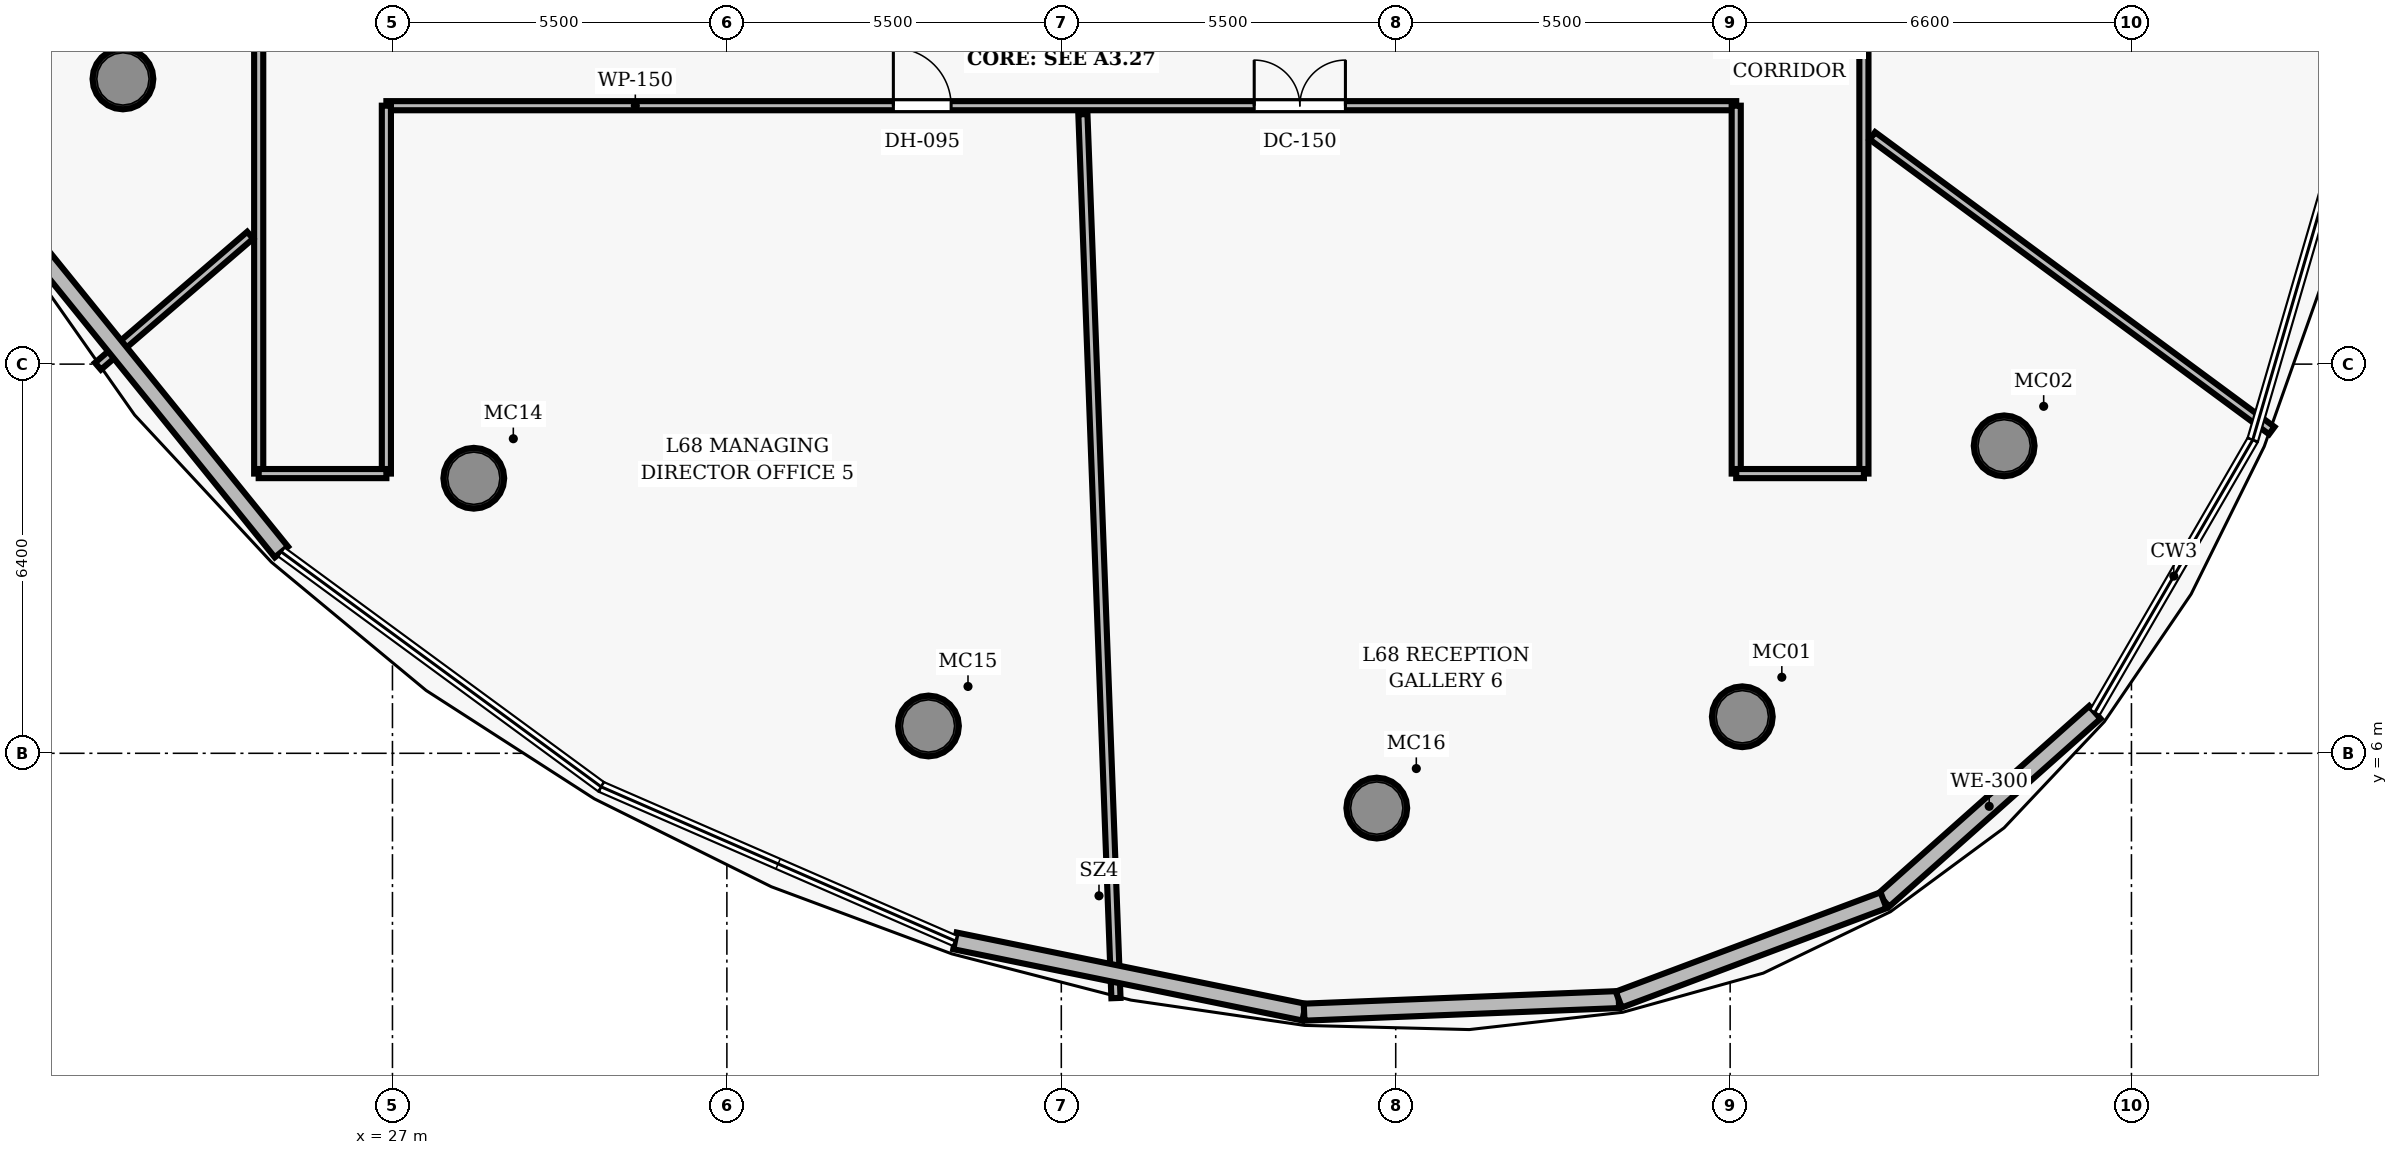
"""IFC4 building model, lengths in metres.
Left out: names, types, materials, properties, quantities, classifications, styles, units other than length and angle.
Written with IfcOpenShell. Run it as: python <this file> out.ifc"""

import sys

from ifc_helpers import new_model, si_unit, direction, frame, frame_2d, origin, origin_2d, place, context, subcontext, project, spatial, rectangle, hollow_circle, extrude, element, fill, save


model = new_model("IFC4")
c1 = context("Model", 3, precision=1e-05, world=origin(), true_north=direction((0.0, 1.0)))
c2 = subcontext(c1, "Body", "Model", "MODEL_VIEW")
j1 = project(units=[si_unit("LENGTHUNIT", "METRE"), si_unit("PLANEANGLEUNIT", "RADIAN")], contexts=[c1])
p1 = place(None, origin())
s1 = spatial("IfcSite", under=j1, at=p1, CompositionType="ELEMENT")
p2 = place(p1, origin())
s2 = spatial("IfcBuilding", under=s1, at=p2, CompositionType="ELEMENT")
p3 = place(p2, frame((0.0, 0.0, 269.0)))
s3 = spatial("IfcBuildingStorey", under=s2, at=p3, CompositionType="ELEMENT", Elevation=269.0)
for number, where, z_axis, x_axis in (
    (1, (49.2, 6.601, 0.0), (0.0, 0.0, 1.0), (1.0, 0.0, 0.0)),
    (2, (53.506, 11.056, 0.0), (0.0, 0.0, 1.0), (1.0, 0.0, 0.0)),
    (3, (22.567, 17.09, 0.0), (0.0, 0.0, 1.0), (1.0, 0.0, 0.0)),
    (4, (28.338, 10.523, 0.0), (0.0, 0.0, 1.0), (1.0, 0.0, 0.0)),
    (5, (35.815, 6.449, 0.0), (0.0, 0.0, 1.0), (1.0, 0.0, 0.0)),
    (6, (43.188, 5.099, 0.0), (0.0, 0.0, 1.0), (1.0, 0.0, 0.0)),
):
    element("IfcColumn", number, at=place(p3, frame(where, z_axis=z_axis, x_axis=x_axis)), inside=s3, PredefinedType="COLUMN", context=c2, shape_type="SweptSolid", body=[
        extrude(hollow_circle(Radius=0.5, WallThickness=0.045, at=origin_2d()), origin(), (0.0, 0.0, 1.0), 3.85),
    ])
p4 = place(p3, frame((26.9, 16.65, 0.0), z_axis=(0.0, 0.0, 1.0), x_axis=(1.0, 0.0, 0.0)))
e7 = element("IfcWall", 7, at=p4, inside=s3, PredefinedType="PARTITIONING", context=c2, shape_type="SweptSolid", body=[
    extrude(rectangle(XDim=22.2, YDim=0.15, at=frame_2d((11.1, 0.0))), origin(), (0.0, 0.0, 1.0), 3.04),
])
p5 = place(p4, frame((8.338, 0.0, 0.0)))
e8 = element("IfcOpeningElement", 8, at=p5, cuts=e7, PredefinedType="OPENING", context=c2, shape_type="SweptSolid", body=[
    extrude(rectangle(XDim=0.95, YDim=2.15, at=frame_2d((0.475, 1.075))), frame((0.0, 0.085, 0.0), z_axis=(0.0, -1.0, 0.0), x_axis=(1.0, 0.0, 0.0)), (0.0, 0.0, 1.0), 0.17),
])
p6 = place(p4, frame((14.273, 0.0, 0.0)))
e9 = element("IfcOpeningElement", 9, at=p6, cuts=e7, PredefinedType="OPENING", context=c2, shape_type="SweptSolid", body=[
    extrude(rectangle(XDim=1.5, YDim=2.2, at=frame_2d((0.75, 1.1))), frame((0.0, 0.085, 0.0), z_axis=(0.0, -1.0, 0.0), x_axis=(1.0, 0.0, 0.0)), (0.0, 0.0, 1.0), 0.17),
])
p7 = place(p3, frame((24.8, 10.6, 0.0), z_axis=(0.0, 0.0, 1.0), x_axis=(0.0, 1.0, 0.0)))
e10 = element("IfcWall", 10, at=p7, inside=s3, PredefinedType="PARTITIONING", context=c2, shape_type="SweptSolid", body=[
    extrude(rectangle(XDim=30.8, YDim=0.15, at=frame_2d((15.4, 0.0))), origin(), (0.0, 0.0, 1.0), 3.04),
])
p8 = place(p7, frame((14.092, 0.0, 0.0)))
e11 = element("IfcOpeningElement", 11, at=p8, cuts=e10, PredefinedType="OPENING", context=c2, shape_type="SweptSolid", body=[
    extrude(rectangle(XDim=0.95, YDim=2.15, at=frame_2d((0.475, 1.075))), frame((0.0, 0.085, 0.0), z_axis=(0.0, -1.0, 0.0), x_axis=(1.0, 0.0, 0.0)), (0.0, 0.0, 1.0), 0.17),
])
p9 = place(p3, frame((26.9, 10.6, 0.0), z_axis=(0.0, 0.0, 1.0), x_axis=(0.0, 1.0, 0.0)))
e12 = element("IfcWall", 12, at=p9, inside=s3, PredefinedType="PARTITIONING", context=c2, shape_type="SweptSolid", body=[
    extrude(rectangle(XDim=6.05, YDim=0.15, at=frame_2d((3.025, 0.0))), origin(), (0.0, 0.0, 1.0), 3.04),
])
p10 = place(p3, frame((24.8, 10.6, 0.0), z_axis=(0.0, 0.0, 1.0), x_axis=(1.0, 0.0, 0.0)))
e13 = element("IfcWall", 13, at=p10, inside=s3, PredefinedType="PARTITIONING", context=c2, shape_type="SweptSolid", body=[
    extrude(rectangle(XDim=2.1, YDim=0.15, at=frame_2d((1.05, 0.0))), origin(), (0.0, 0.0, 1.0), 3.04),
])
p11 = place(p3, frame((51.2, 10.6, 0.0), z_axis=(0.0, 0.0, 1.0), x_axis=(0.0, 1.0, 0.0)))
e14 = element("IfcWall", 14, at=p11, inside=s3, PredefinedType="PARTITIONING", context=c2, shape_type="SweptSolid", body=[
    extrude(rectangle(XDim=30.104, YDim=0.15, at=frame_2d((15.052, 0.0))), origin(), (0.0, 0.0, 1.0), 3.04),
])
p12 = place(p11, frame((26.496, 0.0, 0.0)))
e15 = element("IfcOpeningElement", 15, at=p12, cuts=e14, PredefinedType="OPENING", context=c2, shape_type="SweptSolid", body=[
    extrude(rectangle(XDim=1.5, YDim=2.2, at=frame_2d((0.75, 1.1))), frame((0.0, 0.085, 0.0), z_axis=(0.0, -1.0, 0.0), x_axis=(1.0, 0.0, 0.0)), (0.0, 0.0, 1.0), 0.17),
])
p13 = place(p11, frame((11.788, 0.0, 0.0)))
e16 = element("IfcOpeningElement", 16, at=p13, cuts=e14, PredefinedType="OPENING", context=c2, shape_type="SweptSolid", body=[
    extrude(rectangle(XDim=0.95, YDim=2.15, at=frame_2d((0.475, 1.075))), frame((0.0, 0.085, 0.0), z_axis=(0.0, -1.0, 0.0), x_axis=(1.0, 0.0, 0.0)), (0.0, 0.0, 1.0), 0.17),
])
p14 = place(p3, frame((49.1, 10.6, 0.0), z_axis=(0.0, 0.0, 1.0), x_axis=(0.0, 1.0, 0.0)))
e17 = element("IfcWall", 17, at=p14, inside=s3, PredefinedType="PARTITIONING", context=c2, shape_type="SweptSolid", body=[
    extrude(rectangle(XDim=6.05, YDim=0.15, at=frame_2d((3.025, 0.0))), origin(), (0.0, 0.0, 1.0), 3.04),
])
p15 = place(p3, frame((49.1, 10.6, 0.0), z_axis=(0.0, 0.0, 1.0), x_axis=(1.0, 0.0, 0.0)))
e18 = element("IfcWall", 18, at=p15, inside=s3, PredefinedType="PARTITIONING", context=c2, shape_type="SweptSolid", body=[
    extrude(rectangle(XDim=2.1, YDim=0.15, at=frame_2d((1.05, 0.0))), origin(), (0.0, 0.0, 1.0), 3.04),
])
p16 = place(p3, frame((24.66, 14.52, 0.0), z_axis=(0.0, 0.0, 1.0), x_axis=(-0.757950522392, -0.65231204619, 0.0)))
e19 = element("IfcWall", 19, at=p16, inside=s3, PredefinedType="PARTITIONING", context=c2, shape_type="SweptSolid", body=[
    extrude(rectangle(XDim=3.302, YDim=0.15, at=frame_2d((1.651, 0.0))), origin(), (0.0, 0.0, 1.0), 3.04),
])
p17 = place(p3, frame((38.355, 16.51, 0.0), z_axis=(0.0, 0.0, 1.0), x_axis=(0.037395304303, -0.999300550994, 0.0)))
e20 = element("IfcWall", 20, at=p17, inside=s3, PredefinedType="PARTITIONING", context=c2, shape_type="SweptSolid", body=[
    extrude(rectangle(XDim=14.546, YDim=0.15, at=frame_2d((7.273, 0.0))), origin(), (0.0, 0.0, 1.0), 3.04),
])
p18 = place(p3, frame((51.34, 16.155, 0.0), z_axis=(0.0, 0.0, 1.0), x_axis=(0.804595515119, -0.593823254049, 0.0)))
e21 = element("IfcWall", 21, at=p18, inside=s3, PredefinedType="PARTITIONING", context=c2, shape_type="SweptSolid", body=[
    extrude(rectangle(XDim=8.163, YDim=0.15, at=frame_2d((4.081, 0.0))), origin(), (0.0, 0.0, 1.0), 3.04),
])
p19 = place(p3, frame((54.998, 6.673, 0.0), z_axis=(0.0, 0.0, 1.0), x_axis=(-0.747287659095, -0.664500680634, 0.0)))
e22 = element("IfcWall", 22, at=p19, inside=s3, PredefinedType="SOLIDWALL", context=c2, shape_type="SweptSolid", body=[
    extrude(rectangle(XDim=4.651, YDim=0.28, at=frame_2d((2.325, 0.0))), origin(), (0.0, 0.0, 1.0), 3.625),
])
p20 = place(p3, frame((25.174, 9.311, 0.0), z_axis=(0.0, 0.0, 1.0), x_axis=(-0.629055110494, 0.777360706469, 0.0)))
e23 = element("IfcWall", 23, at=p20, inside=s3, PredefinedType="SOLIDWALL", context=c2, shape_type="SweptSolid", body=[
    extrude(rectangle(XDim=6.527, YDim=0.28, at=frame_2d((3.264, 0.0))), origin(), (0.0, 0.0, 1.0), 3.625),
])
p21 = place(p3, frame((41.993, 1.743, 0.0), z_axis=(0.0, 0.0, 1.0), x_axis=(-0.979782730414, 0.200064492556, 0.0)))
e24 = element("IfcWall", 24, at=p21, inside=s3, PredefinedType="SOLIDWALL", context=c2, shape_type="SweptSolid", body=[
    extrude(rectangle(XDim=5.86, YDim=0.28, at=frame_2d((2.93, 0.0))), origin(), (0.0, 0.0, 1.0), 3.625),
])
p22 = place(p3, frame((47.168, 1.95, 0.0), z_axis=(0.0, 0.0, 1.0), x_axis=(-0.999198848892, -0.04002074929, 0.0)))
e25 = element("IfcWall", 25, at=p22, inside=s3, PredefinedType="SOLIDWALL", context=c2, shape_type="SweptSolid", body=[
    extrude(rectangle(XDim=5.179, YDim=0.28, at=frame_2d((2.59, 0.0))), origin(), (0.0, 0.0, 1.0), 3.625),
])
p23 = place(p3, frame((51.523, 3.583, 0.0), z_axis=(0.0, 0.0, 1.0), x_axis=(-0.936337806942, -0.351100429066, 0.0)))
e26 = element("IfcWall", 26, at=p23, inside=s3, PredefinedType="SOLIDWALL", context=c2, shape_type="SweptSolid", body=[
    extrude(rectangle(XDim=4.651, YDim=0.28, at=frame_2d((2.325, 0.0))), origin(), (0.0, 0.0, 1.0), 3.625),
])
p24 = place(p5, origin())
e27 = element("IfcDoor", 27, at=p24, inside=s3, OperationType="SINGLE_SWING_LEFT", PredefinedType="DOOR", context=c2, shape_type="SweptSolid", body=[
    extrude(rectangle(XDim=0.95, YDim=2.15, at=frame_2d((0.475, 1.075))), frame((0.0, 0.025, 0.0), z_axis=(0.0, -1.0, 0.0), x_axis=(1.0, 0.0, 0.0)), (0.0, 0.0, 1.0), 0.05),
])
fill(e8, e27)
p25 = place(p6, origin())
e28 = element("IfcDoor", 28, at=p25, inside=s3, OperationType="DOUBLE_DOOR_SINGLE_SWING", PredefinedType="DOOR", context=c2, shape_type="SweptSolid", body=[
    extrude(rectangle(XDim=1.5, YDim=2.2, at=frame_2d((0.75, 1.1))), frame((0.0, 0.025, 0.0), z_axis=(0.0, -1.0, 0.0), x_axis=(1.0, 0.0, 0.0)), (0.0, 0.0, 1.0), 0.05),
])
fill(e9, e28)
save(model, sys.argv[1])
